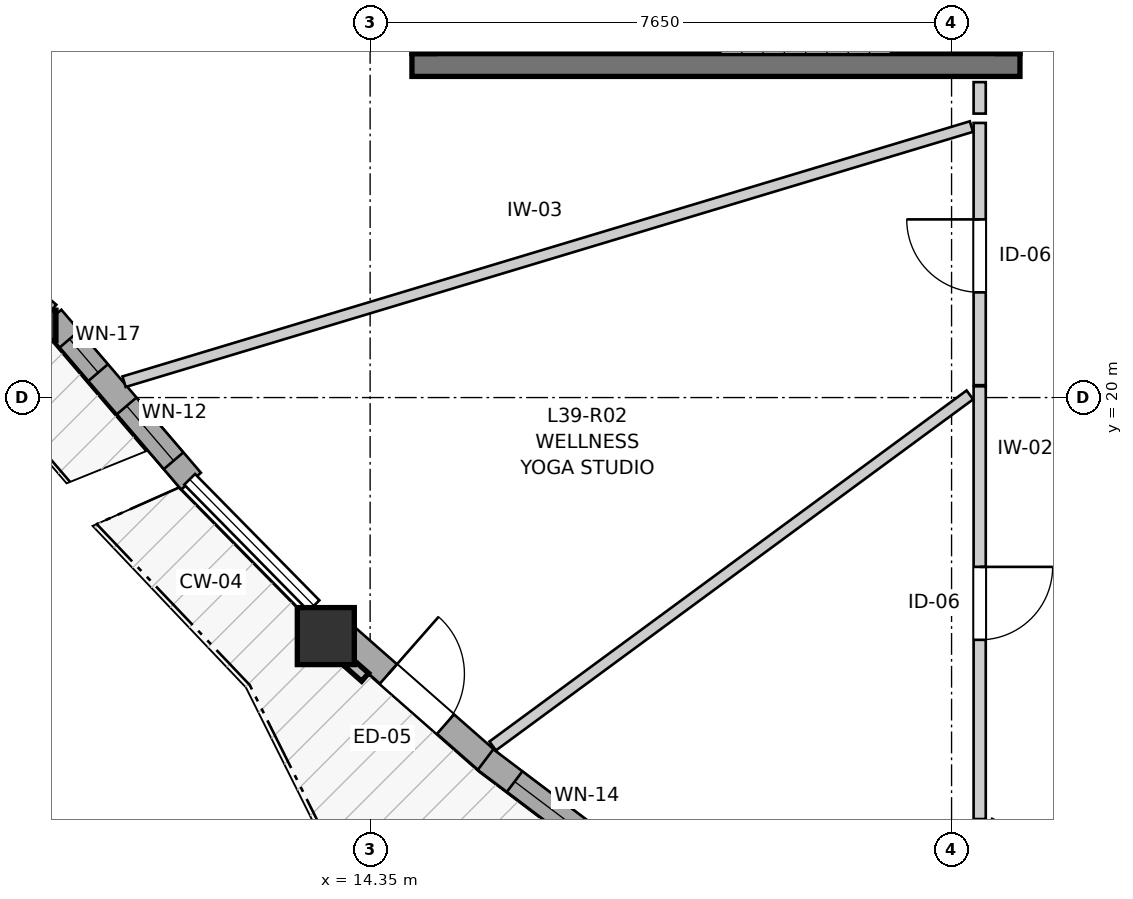
"""IFC4 building model, lengths in metres.
Left out: names, types, materials, properties, quantities, classifications, styles, units other than length and angle.
Written with IfcOpenShell. Run it as: python <this file> out.ifc"""

import sys

from ifc_helpers import new_model, si_unit, direction, frame, frame_2d, origin, origin_2d, place, context, subcontext, project, spatial, rectangle, i_section, extrude, source, transform, mapped, element, fill, save


model = new_model("IFC4")
c1 = context("Model", 3, precision=1e-05, world=origin(), true_north=direction((0.0, 1.0)))
c2 = subcontext(c1, "Body", "Model", "MODEL_VIEW")
j1 = project(units=[si_unit("LENGTHUNIT", "METRE"), si_unit("PLANEANGLEUNIT", "RADIAN")], contexts=[c1])
p1 = place(None, origin())
s1 = spatial("IfcSite", under=j1, at=p1, CompositionType="ELEMENT")
p2 = place(p1, origin())
s2 = spatial("IfcBuilding", under=s1, at=p2, CompositionType="ELEMENT")
p3 = place(p2, frame((0.0, 0.0, 133.0)))
s3 = spatial("IfcBuildingStorey", under=s2, at=p3, CompositionType="ELEMENT", Elevation=133.0)
p4 = place(p3, frame((14.9, 24.375, 0.0), z_axis=(0.0, 0.0, 1.0), x_axis=(1.0, 0.0, 0.0)))
e1 = element("IfcWall", 1, at=p4, inside=s3, PredefinedType="SHEAR", context=c2, shape_type="SweptSolid", body=[
    extrude(rectangle(XDim=8.0, YDim=0.3, at=frame_2d((4.0, 0.0))), origin(), (0.0, 0.0, 1.0), 2.95),
])
p5 = place(p3, frame((15.05, 27.475, 0.0), z_axis=(0.0, 0.0, 1.0), x_axis=(0.0, -1.0, 0.0)))
e2 = element("IfcWall", 2, at=p5, inside=s3, PredefinedType="SHEAR", context=c2, shape_type="SweptSolid", body=[
    extrude(rectangle(XDim=2.95, YDim=0.3, at=frame_2d((1.475, 0.0))), origin(), (0.0, 0.0, 1.0), 2.95),
])
p6 = place(p3, frame((22.75, 24.525, 0.0), z_axis=(0.0, 0.0, 1.0), x_axis=(0.0, 1.0, 0.0)))
e3 = element("IfcWall", 3, at=p6, inside=s3, PredefinedType="SHEAR", context=c2, shape_type="SweptSolid", body=[
    extrude(rectangle(XDim=2.95, YDim=0.3, at=frame_2d((1.475, 0.0))), origin(), (0.0, 0.0, 1.0), 2.95),
])
p7 = place(p6, frame((0.985, 0.0, 0.0)))
e4 = element("IfcOpeningElement", 4, at=p7, cuts=e3, PredefinedType="OPENING", context=c2, shape_type="SweptSolid", body=[
    extrude(rectangle(XDim=0.98, YDim=2.15, at=frame_2d((0.49, 1.075))), frame((0.0, 0.16, 0.0), z_axis=(0.0, -1.0, 0.0), x_axis=(1.0, 0.0, 0.0)), (0.0, 0.0, 1.0), 0.32),
])
m1 = source(origin(), c2, "Body", "SweptSolid", [
    extrude(i_section(OverallWidth=0.401, OverallDepth=0.399, WebThickness=0.023, FlangeThickness=0.036, FilletRadius=0.015, at=origin_2d()), origin(), (0.0, 0.0, 1.0), 2.95),
])
p8 = place(p3, frame((10.016, 20.95, 0.0), z_axis=(0.0, 0.0, 1.0), x_axis=(1.0, 0.0, 0.0)))
e5 = element("IfcColumn", 5, at=p8, inside=s3, PredefinedType="PILASTER", context=c2, shape_type="MappedRepresentation", body=[
    mapped(m1, transform((0.0, 0.0, 0.0), x_axis=(1.0, 0.0, 0.0), y_axis=(0.0, 1.0, 0.0), z_axis=(0.0, 0.0, 1.0), scale=1.0)),
])
m2 = source(origin(), c2, "Body", "SweptSolid", [
    extrude(rectangle(XDim=0.75, YDim=0.75, at=origin_2d()), origin(), (0.0, 0.0, 1.0), 2.95),
])
p9 = place(p3, frame((13.767, 16.862, 0.0), z_axis=(0.0, 0.0, 1.0), x_axis=(1.0, 0.0, 0.0)))
e6 = element("IfcColumn", 6, at=p9, inside=s3, PredefinedType="COLUMN", context=c2, shape_type="MappedRepresentation", body=[
    mapped(m2, transform((0.0, 0.0, 0.0), x_axis=(1.0, 0.0, 0.0), y_axis=(0.0, 1.0, 0.0), z_axis=(0.0, 0.0, 1.0), scale=1.0)),
])
p10 = place(p3, frame((8.573, 22.406, 0.0), z_axis=(0.0, 0.0, 1.0), x_axis=(0.760379886087, -0.649478582276, 0.0)))
e7 = element("IfcWall", 7, at=p10, inside=s3, PredefinedType="SOLIDWALL", context=c2, shape_type="SweptSolid", body=[
    extrude(rectangle(XDim=2.023, YDim=0.34, at=frame_2d((1.012, 0.0))), origin(), (0.0, 0.0, 1.0), 2.53),
])
p11 = place(p10, frame((0.322, 0.0, 0.82)))
e8 = element("IfcOpeningElement", 8, at=p11, cuts=e7, PredefinedType="OPENING", context=c2, shape_type="SweptSolid", body=[
    extrude(rectangle(XDim=1.4, YDim=1.35, at=frame_2d((0.7, 0.675))), frame((0.0, 0.18, 0.0), z_axis=(0.0, -1.0, 0.0), x_axis=(1.0, 0.0, 0.0)), (0.0, 0.0, 1.0), 0.36),
])
p12 = place(p3, frame((10.158, 21.045, 0.0), z_axis=(0.0, 0.0, 1.0), x_axis=(0.650385352329, -0.759604432238, 0.0)))
e9 = element("IfcWall", 9, at=p12, inside=s3, PredefinedType="SOLIDWALL", context=c2, shape_type="SweptSolid", body=[
    extrude(rectangle(XDim=2.823, YDim=0.34, at=frame_2d((1.412, 0.0))), origin(), (0.0, 0.0, 1.0), 2.53),
])
p13 = place(p12, frame((0.364, 0.0, 0.82)))
e10 = element("IfcOpeningElement", 10, at=p13, cuts=e9, PredefinedType="OPENING", context=c2, shape_type="SweptSolid", body=[
    extrude(rectangle(XDim=0.58, YDim=1.35, at=frame_2d((0.29, 0.675))), frame((0.0, 0.18, 0.0), z_axis=(0.0, -1.0, 0.0), x_axis=(1.0, 0.0, 0.0)), (0.0, 0.0, 1.0), 0.36),
])
p14 = place(p12, frame((1.52, 0.0, 0.82)))
e11 = element("IfcOpeningElement", 11, at=p14, cuts=e9, PredefinedType="OPENING", context=c2, shape_type="SweptSolid", body=[
    extrude(rectangle(XDim=0.95, YDim=1.35, at=frame_2d((0.475, 0.675))), frame((0.0, 0.18, 0.0), z_axis=(0.0, -1.0, 0.0), x_axis=(1.0, 0.0, 0.0)), (0.0, 0.0, 1.0), 0.36),
])
p15 = place(p3, frame((13.996, 16.887, 0.0), z_axis=(0.0, 0.0, 1.0), x_axis=(0.75116489845, -0.660114607729, 0.0)))
e12 = element("IfcWall", 12, at=p15, inside=s3, PredefinedType="SOLIDWALL", context=c2, shape_type="SweptSolid", body=[
    extrude(rectangle(XDim=2.585, YDim=0.34, at=frame_2d((1.292, 0.0))), origin(), (0.0, 0.0, 1.0), 2.53),
])
p16 = place(p15, frame((0.792, 0.0, 0.0)))
e13 = element("IfcOpeningElement", 13, at=p16, cuts=e12, PredefinedType="OPENING", context=c2, shape_type="SweptSolid", body=[
    extrude(rectangle(XDim=1.0, YDim=2.1, at=frame_2d((0.5, 1.05))), frame((0.0, 0.18, 0.0), z_axis=(0.0, -1.0, 0.0), x_axis=(1.0, 0.0, 0.0)), (0.0, 0.0, 1.0), 0.36),
])
p17 = place(p3, frame((15.868, 15.237, 0.0), z_axis=(0.0, 0.0, 1.0), x_axis=(0.798078784288, -0.602553113069, 0.0)))
e14 = element("IfcWall", 14, at=p17, inside=s3, PredefinedType="SOLIDWALL", context=c2, shape_type="SweptSolid", body=[
    extrude(rectangle(XDim=2.689, YDim=0.34, at=frame_2d((1.345, 0.0))), origin(), (0.0, 0.0, 1.0), 2.53),
])
p18 = place(p17, frame((0.48, 0.0, 0.82)))
e15 = element("IfcOpeningElement", 15, at=p18, cuts=e14, PredefinedType="OPENING", context=c2, shape_type="SweptSolid", body=[
    extrude(rectangle(XDim=1.75, YDim=1.3, at=frame_2d((0.875, 0.65))), frame((0.0, 0.18, 0.0), z_axis=(0.0, -1.0, 0.0), x_axis=(1.0, 0.0, 0.0)), (0.0, 0.0, 1.0), 0.36),
])
p19 = place(p3, frame((22.37, 20.148, 0.0), z_axis=(0.0, 0.0, 1.0), x_axis=(0.0, -1.0, 0.0)))
e16 = element("IfcWall", 16, at=p19, inside=s3, PredefinedType="PARTITIONING", context=c2, shape_type="SweptSolid", body=[
    extrude(rectangle(XDim=5.693, YDim=0.16, at=frame_2d((2.846, 0.0))), origin(), (0.0, 0.0, 1.0), 2.95),
])
p20 = place(p19, frame((2.375, 0.0, 0.0)))
e17 = element("IfcOpeningElement", 17, at=p20, cuts=e16, PredefinedType="OPENING", context=c2, shape_type="SweptSolid", body=[
    extrude(rectangle(XDim=0.96, YDim=2.1, at=frame_2d((0.48, 1.05))), frame((0.0, 0.09, 0.0), z_axis=(0.0, -1.0, 0.0), x_axis=(1.0, 0.0, 0.0)), (0.0, 0.0, 1.0), 0.18),
])
p21 = place(p3, frame((22.37, 20.163, 0.0), z_axis=(0.0, 0.0, 1.0), x_axis=(0.0, 1.0, 0.0)))
e18 = element("IfcWall", 18, at=p21, inside=s3, PredefinedType="PARTITIONING", context=c2, shape_type="SweptSolid", body=[
    extrude(rectangle(XDim=3.45, YDim=0.16, at=frame_2d((1.725, 0.0))), origin(), (0.0, 0.0, 1.0), 2.95),
])
p22 = place(p21, frame((1.221, 0.0, 0.0)))
e19 = element("IfcOpeningElement", 19, at=p22, cuts=e18, PredefinedType="OPENING", context=c2, shape_type="SweptSolid", body=[
    extrude(rectangle(XDim=0.96, YDim=2.1, at=frame_2d((0.48, 1.05))), frame((0.0, 0.09, 0.0), z_axis=(0.0, -1.0, 0.0), x_axis=(1.0, 0.0, 0.0)), (0.0, 0.0, 1.0), 0.18),
])
p23 = place(p3, frame((11.113, 20.208, 0.0), z_axis=(0.0, 0.0, 1.0), x_axis=(0.957541878855, 0.288294207778, 0.0)))
e20 = element("IfcWall", 20, at=p23, inside=s3, PredefinedType="PARTITIONING", context=c2, shape_type="SweptSolid", body=[
    extrude(rectangle(XDim=11.643, YDim=0.145, at=frame_2d((5.822, 0.0))), origin(), (0.0, 0.0, 1.0), 2.95),
])
p24 = place(p3, frame((15.962, 15.416, 0.0), z_axis=(0.0, 0.0, 1.0), x_axis=(0.805487856374, 0.59261227901, 0.0)))
e21 = element("IfcWall", 21, at=p24, inside=s3, PredefinedType="PARTITIONING", context=c2, shape_type="SweptSolid", body=[
    extrude(rectangle(XDim=7.794, YDim=0.145, at=frame_2d((3.897, 0.0))), origin(), (0.0, 0.0, 1.0), 2.95),
])
p25 = place(p3, frame((22.495, 14.387, 0.0), z_axis=(0.0, 0.0, 1.0), x_axis=(0.879618674253, -0.475679501245, 0.0)))
e22 = element("IfcWall", 22, at=p25, inside=s3, PredefinedType="PARTITIONING", context=c2, shape_type="SweptSolid", body=[
    extrude(rectangle(XDim=1.603, YDim=0.16, at=frame_2d((0.801, 0.0))), origin(), (0.0, 0.0, 1.0), 2.95),
])
p26 = place(p3, frame((22.37, 23.736, 0.0), z_axis=(0.0, 0.0, 1.0), x_axis=(0.0, 1.0, 0.0)))
e23 = element("IfcWall", 23, at=p26, inside=s3, PredefinedType="PARTITIONING", context=c2, shape_type="SweptSolid", body=[
    extrude(rectangle(XDim=0.414, YDim=0.16, at=frame_2d((0.207, 0.0))), origin(), (0.0, 0.0, 1.0), 2.95),
])
m3 = source(origin(), c2, "Body", "SweptSolid", [
    extrude(rectangle(XDim=0.58, YDim=1.35, at=frame_2d((0.29, 0.675))), frame((0.0, 0.03, 0.0), z_axis=(0.0, -1.0, 0.0), x_axis=(1.0, 0.0, 0.0)), (0.0, 0.0, 1.0), 0.06),
])
p27 = place(p13, origin())
e24 = element("IfcWindow", 24, at=p27, inside=s3, PartitioningType="SINGLE_PANEL", PredefinedType="WINDOW", context=c2, shape_type="MappedRepresentation", body=[
    mapped(m3, transform((0.0, 0.0, 0.0), x_axis=(1.0, 0.0, 0.0), y_axis=(0.0, 1.0, 0.0), z_axis=(0.0, 0.0, 1.0), scale=1.0)),
])
fill(e10, e24)
m4 = source(origin(), c2, "Body", "SweptSolid", [
    extrude(rectangle(XDim=0.95, YDim=1.35, at=frame_2d((0.475, 0.675))), frame((0.0, 0.03, 0.0), z_axis=(0.0, -1.0, 0.0), x_axis=(1.0, 0.0, 0.0)), (0.0, 0.0, 1.0), 0.06),
])
p28 = place(p14, origin())
e25 = element("IfcWindow", 25, at=p28, inside=s3, PartitioningType="SINGLE_PANEL", PredefinedType="WINDOW", context=c2, shape_type="MappedRepresentation", body=[
    mapped(m4, transform((0.0, 0.0, 0.0), x_axis=(1.0, 0.0, 0.0), y_axis=(0.0, 1.0, 0.0), z_axis=(0.0, 0.0, 1.0), scale=1.0)),
])
fill(e11, e25)
m5 = source(origin(), c2, "Body", "SweptSolid", [
    extrude(rectangle(XDim=1.75, YDim=1.3, at=frame_2d((0.875, 0.65))), frame((0.0, 0.03, 0.0), z_axis=(0.0, -1.0, 0.0), x_axis=(1.0, 0.0, 0.0)), (0.0, 0.0, 1.0), 0.06),
])
p29 = place(p18, origin())
e26 = element("IfcWindow", 26, at=p29, inside=s3, PartitioningType="SINGLE_PANEL", PredefinedType="WINDOW", context=c2, shape_type="MappedRepresentation", body=[
    mapped(m5, transform((0.0, 0.0, 0.0), x_axis=(1.0, 0.0, 0.0), y_axis=(0.0, 1.0, 0.0), z_axis=(0.0, 0.0, 1.0), scale=1.0)),
])
fill(e15, e26)
m6 = source(origin(), c2, "Body", "SweptSolid", [
    extrude(rectangle(XDim=1.0, YDim=2.1, at=frame_2d((0.5, 1.05))), frame((0.0, 0.025, 0.0), z_axis=(0.0, -1.0, 0.0), x_axis=(1.0, 0.0, 0.0)), (0.0, 0.0, 1.0), 0.05),
])
p30 = place(p16, origin())
e27 = element("IfcDoor", 27, at=p30, inside=s3, OperationType="SINGLE_SWING_LEFT", PredefinedType="DOOR", context=c2, shape_type="MappedRepresentation", body=[
    mapped(m6, transform((0.0, 0.0, 0.0), x_axis=(1.0, 0.0, 0.0), y_axis=(0.0, 1.0, 0.0), z_axis=(0.0, 0.0, 1.0), scale=1.0)),
])
fill(e13, e27)
m7 = source(origin(), c2, "Body", "SweptSolid", [
    extrude(rectangle(XDim=0.96, YDim=2.1, at=frame_2d((0.48, 1.05))), frame((0.0, 0.025, 0.0), z_axis=(0.0, -1.0, 0.0), x_axis=(1.0, 0.0, 0.0)), (0.0, 0.0, 1.0), 0.05),
])
p31 = place(p20, origin())
e28 = element("IfcDoor", 28, at=p31, inside=s3, OperationType="SINGLE_SWING_LEFT", PredefinedType="DOOR", context=c2, shape_type="MappedRepresentation", body=[
    mapped(m7, transform((0.0, 0.0, 0.0), x_axis=(1.0, 0.0, 0.0), y_axis=(0.0, 1.0, 0.0), z_axis=(0.0, 0.0, 1.0), scale=1.0)),
])
fill(e17, e28)
p32 = place(p22, origin())
e29 = element("IfcDoor", 29, at=p32, inside=s3, OperationType="SINGLE_SWING_RIGHT", PredefinedType="DOOR", context=c2, shape_type="MappedRepresentation", body=[
    mapped(m7, transform((0.0, 0.0, 0.0), x_axis=(1.0, 0.0, 0.0), y_axis=(0.0, 1.0, 0.0), z_axis=(0.0, 0.0, 1.0), scale=1.0)),
])
fill(e19, e29)
save(model, sys.argv[1])
